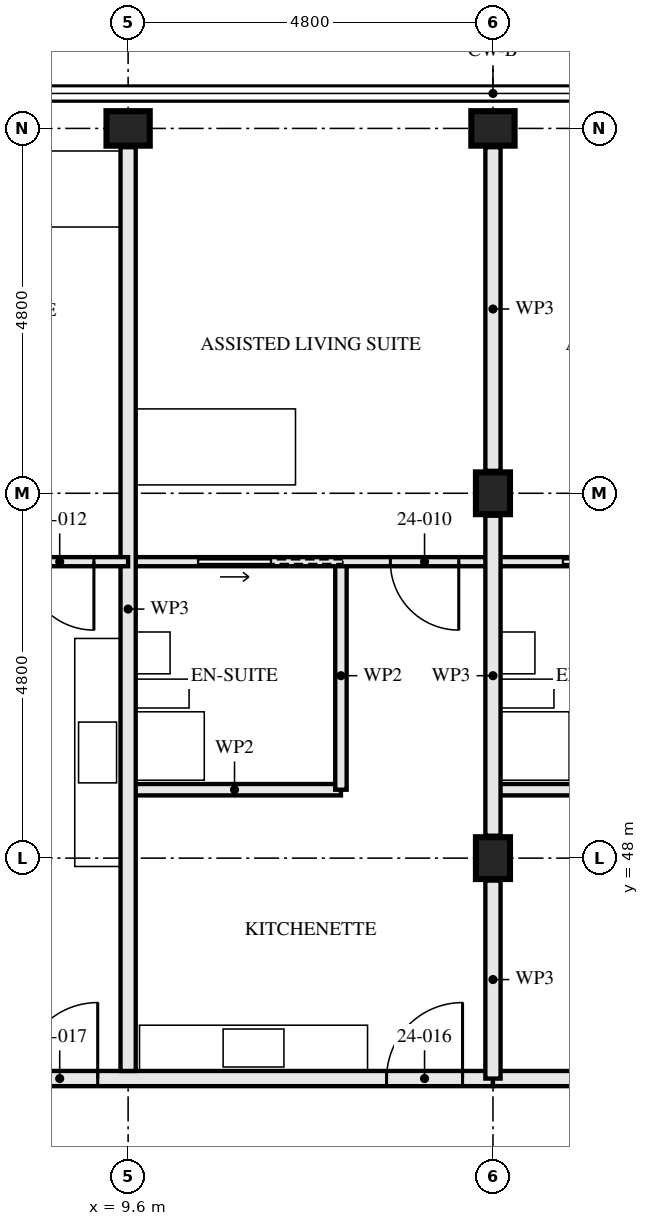
"""IFC4 building model, lengths in metres.
Left out: names, types, materials, properties, quantities, classifications, styles, units other than length and angle.
Written with IfcOpenShell. Run it as: python <this file> out.ifc"""

import sys

from ifc_helpers import new_model, si_unit, direction, frame, frame_2d, origin, origin_2d, place, context, subcontext, project, spatial, rectangle, i_section, extrude, element, fill, save


model = new_model("IFC4")
c1 = context("Model", 3, precision=1e-05, world=origin(), true_north=direction((0.0, 1.0)))
c2 = subcontext(c1, "Body", "Model", "MODEL_VIEW")
j1 = project(units=[si_unit("LENGTHUNIT", "METRE"), si_unit("PLANEANGLEUNIT", "RADIAN")], contexts=[c1])
p1 = place(None, origin())
s1 = spatial("IfcSite", under=j1, at=p1, CompositionType="ELEMENT")
p2 = place(p1, origin())
s2 = spatial("IfcBuilding", under=s1, at=p2, CompositionType="ELEMENT")
p3 = place(p2, frame((0.0, 0.0, 91.0)))
s3 = spatial("IfcBuildingStorey", under=s2, at=p3, CompositionType="ELEMENT", Elevation=91.0)
p4 = place(p3, frame((9.6, 57.6, 0.0), z_axis=(0.0, 0.0, 1.0), x_axis=(0.0, 1.0, 0.0)))
e1 = element("IfcColumn", 1, at=p4, inside=s3, PredefinedType="COLUMN", context=c2, shape_type="SweptSolid", body=[
    extrude(i_section(OverallWidth=0.454, OverallDepth=0.569, WebThickness=0.078, FlangeThickness=0.125, FilletRadius=0.015, at=origin_2d()), origin(), (0.0, 0.0, 1.0), 3.5),
])
for number, where, z_axis, x_axis in (
    (2, (14.4, 48.0, 0.0), (0.0, 0.0, 1.0), (1.0, 0.0, 0.0)),
    (3, (14.4, 52.8, 0.0), (0.0, 0.0, 1.0), (1.0, 0.0, 0.0)),
):
    element("IfcColumn", number, at=place(p3, frame(where, z_axis=z_axis, x_axis=x_axis)), inside=s3, PredefinedType="COLUMN", context=c2, shape_type="SweptSolid", body=[
        extrude(i_section(OverallWidth=0.448, OverallDepth=0.55, WebThickness=0.072, FlangeThickness=0.115, FilletRadius=0.015, at=origin_2d()), origin(), (0.0, 0.0, 1.0), 3.5),
    ])
p5 = place(p3, frame((14.4, 57.6, 0.0), z_axis=(0.0, 0.0, 1.0), x_axis=(0.0, 1.0, 0.0)))
e4 = element("IfcColumn", 4, at=p5, inside=s3, PredefinedType="COLUMN", context=c2, shape_type="SweptSolid", body=[
    extrude(i_section(OverallWidth=0.454, OverallDepth=0.569, WebThickness=0.078, FlangeThickness=0.125, FilletRadius=0.015, at=origin_2d()), origin(), (0.0, 0.0, 1.0), 3.5),
])
p6 = place(p3, frame((12.4, 51.9, 0.0), z_axis=(0.0, 0.0, 1.0), x_axis=(0.0, -1.0, 0.0)))
e5 = element("IfcWall", 5, at=p6, inside=s3, PredefinedType="PARTITIONING", context=c2, shape_type="SweptSolid", body=[
    extrude(rectangle(XDim=3.0, YDim=0.15, at=frame_2d((1.5, 0.0))), origin(), (0.0, 0.0, 1.0), 3.33),
])
p7 = place(p3, frame((12.4, 48.9, 0.0), z_axis=(0.0, 0.0, 1.0), x_axis=(-1.0, 0.0, 0.0)))
e6 = element("IfcWall", 6, at=p7, inside=s3, PredefinedType="PARTITIONING", context=c2, shape_type="SweptSolid", body=[
    extrude(rectangle(XDim=2.8, YDim=0.15, at=frame_2d((1.4, 0.0))), origin(), (0.0, 0.0, 1.0), 3.33),
])
p8 = place(p3, frame((14.4, 51.9, 0.0), z_axis=(0.0, 0.0, 1.0), x_axis=(-1.0, 0.0, 0.0)))
e7 = element("IfcWall", 7, at=p8, inside=s3, PredefinedType="PARTITIONING", context=c2, shape_type="SweptSolid", body=[
    extrude(rectangle(XDim=4.8, YDim=0.12, at=frame_2d((2.4, 0.0))), origin(), (0.0, 0.0, 1.0), 3.33),
])
p9 = place(p8, frame((0.45, 0.0, 0.0)))
e8 = element("IfcOpeningElement", 8, at=p9, cuts=e7, PredefinedType="OPENING", context=c2, shape_type="SweptSolid", body=[
    extrude(rectangle(XDim=0.9, YDim=2.1, at=frame_2d((0.45, 1.05))), frame((0.0, 0.071, 0.0), z_axis=(0.0, -1.0, 0.0), x_axis=(1.0, 0.0, 0.0)), (0.0, 0.0, 1.0), 0.141),
])
p10 = place(p8, frame((2.925, 0.0, 0.0)))
e9 = element("IfcOpeningElement", 9, at=p10, cuts=e7, PredefinedType="OPENING", context=c2, shape_type="SweptSolid", body=[
    extrude(rectangle(XDim=0.95, YDim=2.1, at=frame_2d((0.475, 1.05))), frame((0.0, 0.071, 0.0), z_axis=(0.0, -1.0, 0.0), x_axis=(1.0, 0.0, 0.0)), (0.0, 0.0, 1.0), 0.141),
])
p11 = place(p3, frame((9.6, 57.353, 0.0), z_axis=(0.0, 0.0, 1.0), x_axis=(0.0, -1.0, 0.0)))
e10 = element("IfcWall", 10, at=p11, inside=s3, PredefinedType="PARTITIONING", context=c2, shape_type="SweptSolid", body=[
    extrude(rectangle(XDim=12.153, YDim=0.2, at=frame_2d((6.077, 0.0))), origin(), (0.0, 0.0, 1.0), 2.55),
])
p12 = place(p3, frame((9.6, 51.9, 0.0), z_axis=(0.0, 0.0, 1.0), x_axis=(-1.0, 0.0, 0.0)))
e11 = element("IfcWall", 11, at=p12, inside=s3, PredefinedType="PARTITIONING", context=c2, shape_type="SweptSolid", body=[
    extrude(rectangle(XDim=4.8, YDim=0.12, at=frame_2d((2.4, 0.0))), origin(), (0.0, 0.0, 1.0), 3.33),
])
p13 = place(p12, frame((0.45, 0.0, 0.0)))
e12 = element("IfcOpeningElement", 12, at=p13, cuts=e11, PredefinedType="OPENING", context=c2, shape_type="SweptSolid", body=[
    extrude(rectangle(XDim=0.9, YDim=2.1, at=frame_2d((0.45, 1.05))), frame((0.0, 0.071, 0.0), z_axis=(0.0, -1.0, 0.0), x_axis=(1.0, 0.0, 0.0)), (0.0, 0.0, 1.0), 0.141),
])
p14 = place(p12, frame((2.925, 0.0, 0.0)))
e13 = element("IfcOpeningElement", 13, at=p14, cuts=e11, PredefinedType="OPENING", context=c2, shape_type="SweptSolid", body=[
    extrude(rectangle(XDim=0.95, YDim=2.1, at=frame_2d((0.475, 1.05))), frame((0.0, 0.071, 0.0), z_axis=(0.0, -1.0, 0.0), x_axis=(1.0, 0.0, 0.0)), (0.0, 0.0, 1.0), 0.141),
])
p15 = place(p3, frame((14.4, 45.1, 0.0), z_axis=(0.0, 0.0, 1.0), x_axis=(-1.0, 0.0, 0.0)))
e14 = element("IfcWall", 14, at=p15, inside=s3, PredefinedType="PARTITIONING", context=c2, shape_type="SweptSolid", body=[
    extrude(rectangle(XDim=9.6, YDim=0.2, at=frame_2d((4.8, 0.0))), origin(), (0.0, 0.0, 1.0), 3.33),
])
p16 = place(p15, frame((0.4, 0.0, 0.0)))
e15 = element("IfcOpeningElement", 15, at=p16, cuts=e14, PredefinedType="OPENING", context=c2, shape_type="SweptSolid", body=[
    extrude(rectangle(XDim=1.0, YDim=2.1, at=frame_2d((0.5, 1.05))), frame((0.0, 0.111, 0.0), z_axis=(0.0, -1.0, 0.0), x_axis=(1.0, 0.0, 0.0)), (0.0, 0.0, 1.0), 0.221),
])
p17 = place(p15, frame((5.2, 0.0, 0.0)))
e16 = element("IfcOpeningElement", 16, at=p17, cuts=e14, PredefinedType="OPENING", context=c2, shape_type="SweptSolid", body=[
    extrude(rectangle(XDim=1.0, YDim=2.1, at=frame_2d((0.5, 1.05))), frame((0.0, 0.111, 0.0), z_axis=(0.0, -1.0, 0.0), x_axis=(1.0, 0.0, 0.0)), (0.0, 0.0, 1.0), 0.221),
])
p18 = place(p3, frame((17.2, 48.9, 0.0), z_axis=(0.0, 0.0, 1.0), x_axis=(-1.0, 0.0, 0.0)))
e17 = element("IfcWall", 17, at=p18, inside=s3, PredefinedType="PARTITIONING", context=c2, shape_type="SweptSolid", body=[
    extrude(rectangle(XDim=2.8, YDim=0.15, at=frame_2d((1.4, 0.0))), origin(), (0.0, 0.0, 1.0), 3.33),
])
p19 = place(p3, frame((19.2, 51.9, 0.0), z_axis=(0.0, 0.0, 1.0), x_axis=(-1.0, 0.0, 0.0)))
e18 = element("IfcWall", 18, at=p19, inside=s3, PredefinedType="PARTITIONING", context=c2, shape_type="SweptSolid", body=[
    extrude(rectangle(XDim=4.8, YDim=0.12, at=frame_2d((2.4, 0.0))), origin(), (0.0, 0.0, 1.0), 3.33),
])
p20 = place(p19, frame((0.45, 0.0, 0.0)))
e19 = element("IfcOpeningElement", 19, at=p20, cuts=e18, PredefinedType="OPENING", context=c2, shape_type="SweptSolid", body=[
    extrude(rectangle(XDim=0.9, YDim=2.1, at=frame_2d((0.45, 1.05))), frame((0.0, 0.071, 0.0), z_axis=(0.0, -1.0, 0.0), x_axis=(1.0, 0.0, 0.0)), (0.0, 0.0, 1.0), 0.141),
])
p21 = place(p19, frame((2.925, 0.0, 0.0)))
e20 = element("IfcOpeningElement", 20, at=p21, cuts=e18, PredefinedType="OPENING", context=c2, shape_type="SweptSolid", body=[
    extrude(rectangle(XDim=0.95, YDim=2.1, at=frame_2d((0.475, 1.05))), frame((0.0, 0.071, 0.0), z_axis=(0.0, -1.0, 0.0), x_axis=(1.0, 0.0, 0.0)), (0.0, 0.0, 1.0), 0.141),
])
p22 = place(p3, frame((29.24, 45.1, 0.0), z_axis=(0.0, 0.0, 1.0), x_axis=(-1.0, 0.0, 0.0)))
e21 = element("IfcWall", 21, at=p22, inside=s3, PredefinedType="PARTITIONING", context=c2, shape_type="SweptSolid", body=[
    extrude(rectangle(XDim=14.84, YDim=0.2, at=frame_2d((7.42, 0.0))), origin(), (0.0, 0.0, 1.0), 2.32),
])
p23 = place(p22, frame((0.84, 0.0, 0.0)))
e22 = element("IfcOpeningElement", 22, at=p23, cuts=e21, PredefinedType="OPENING", context=c2, shape_type="SweptSolid", body=[
    extrude(rectangle(XDim=1.0, YDim=2.1, at=frame_2d((0.5, 1.05))), frame((0.0, 0.111, 0.0), z_axis=(0.0, -1.0, 0.0), x_axis=(1.0, 0.0, 0.0)), (0.0, 0.0, 1.0), 0.221),
])
p24 = place(p22, frame((5.64, 0.0, 0.0)))
e23 = element("IfcOpeningElement", 23, at=p24, cuts=e21, PredefinedType="OPENING", context=c2, shape_type="SweptSolid", body=[
    extrude(rectangle(XDim=1.0, YDim=2.1, at=frame_2d((0.5, 1.05))), frame((0.0, 0.111, 0.0), z_axis=(0.0, -1.0, 0.0), x_axis=(1.0, 0.0, 0.0)), (0.0, 0.0, 1.0), 0.221),
])
p25 = place(p22, frame((10.44, 0.0, 0.0)))
e24 = element("IfcOpeningElement", 24, at=p25, cuts=e21, PredefinedType="OPENING", context=c2, shape_type="SweptSolid", body=[
    extrude(rectangle(XDim=1.0, YDim=2.1, at=frame_2d((0.5, 1.05))), frame((0.0, 0.111, 0.0), z_axis=(0.0, -1.0, 0.0), x_axis=(1.0, 0.0, 0.0)), (0.0, 0.0, 1.0), 0.221),
])
p26 = place(p3, frame((14.4, 45.1, 0.0), z_axis=(0.0, 0.0, 1.0), x_axis=(0.0, 1.0, 0.0)))
e25 = element("IfcWall", 25, at=p26, inside=s3, PredefinedType="PARTITIONING", context=c2, shape_type="SweptSolid", body=[
    extrude(rectangle(XDim=2.605, YDim=0.2, at=frame_2d((1.302, 0.0))), origin(), (0.0, 0.0, 1.0), 2.32),
])
p27 = place(p3, frame((14.4, 48.295, 0.0), z_axis=(0.0, 0.0, 1.0), x_axis=(0.0, 1.0, 0.0)))
e26 = element("IfcWall", 26, at=p27, inside=s3, PredefinedType="PARTITIONING", context=c2, shape_type="SweptSolid", body=[
    extrude(rectangle(XDim=4.21, YDim=0.2, at=frame_2d((2.105, 0.0))), origin(), (0.0, 0.0, 1.0), 2.32),
])
p28 = place(p3, frame((14.4, 53.095, 0.0), z_axis=(0.0, 0.0, 1.0), x_axis=(0.0, 1.0, 0.0)))
e27 = element("IfcWall", 27, at=p28, inside=s3, PredefinedType="PARTITIONING", context=c2, shape_type="SweptSolid", body=[
    extrude(rectangle(XDim=4.258, YDim=0.2, at=frame_2d((2.129, 0.0))), origin(), (0.0, 0.0, 1.0), 2.32),
])
p29 = place(p9, origin())
e28 = element("IfcDoor", 28, at=p29, inside=s3, OperationType="SINGLE_SWING_RIGHT", PredefinedType="DOOR", context=c2, shape_type="SweptSolid", body=[
    extrude(rectangle(XDim=0.9, YDim=2.1, at=frame_2d((0.45, 1.05))), frame((0.0, 0.022, 0.0), z_axis=(0.0, -1.0, 0.0), x_axis=(1.0, 0.0, 0.0)), (0.0, 0.0, 1.0), 0.044),
])
fill(e8, e28)
p30 = place(p10, origin())
e29 = element("IfcDoor", 29, at=p30, inside=s3, OperationType="SLIDING_TO_RIGHT", PredefinedType="DOOR", context=c2, shape_type="SweptSolid", body=[
    extrude(rectangle(XDim=0.95, YDim=2.1, at=frame_2d((0.475, 1.05))), frame((0.0, 0.022, 0.0), z_axis=(0.0, -1.0, 0.0), x_axis=(1.0, 0.0, 0.0)), (0.0, 0.0, 1.0), 0.044),
])
fill(e9, e29)
p31 = place(p13, origin())
e30 = element("IfcDoor", 30, at=p31, inside=s3, OperationType="SINGLE_SWING_RIGHT", PredefinedType="DOOR", context=c2, shape_type="SweptSolid", body=[
    extrude(rectangle(XDim=0.9, YDim=2.1, at=frame_2d((0.45, 1.05))), frame((0.0, 0.022, 0.0), z_axis=(0.0, -1.0, 0.0), x_axis=(1.0, 0.0, 0.0)), (0.0, 0.0, 1.0), 0.044),
])
fill(e12, e30)
p32 = place(p16, frame((1.0, 0.0, 0.0), z_axis=(0.0, 0.0, 1.0), x_axis=(-1.0, 0.0, 0.0)))
e31 = element("IfcDoor", 31, at=p32, inside=s3, OperationType="SINGLE_SWING_LEFT", PredefinedType="DOOR", context=c2, shape_type="SweptSolid", body=[
    extrude(rectangle(XDim=1.0, YDim=2.1, at=frame_2d((0.5, 1.05))), frame((0.0, 0.027, 0.0), z_axis=(0.0, -1.0, 0.0), x_axis=(1.0, 0.0, 0.0)), (0.0, 0.0, 1.0), 0.054),
])
fill(e15, e31)
p33 = place(p17, frame((1.0, 0.0, 0.0), z_axis=(0.0, 0.0, 1.0), x_axis=(-1.0, 0.0, 0.0)))
e32 = element("IfcDoor", 32, at=p33, inside=s3, OperationType="SINGLE_SWING_LEFT", PredefinedType="DOOR", context=c2, shape_type="SweptSolid", body=[
    extrude(rectangle(XDim=1.0, YDim=2.1, at=frame_2d((0.5, 1.05))), frame((0.0, 0.027, 0.0), z_axis=(0.0, -1.0, 0.0), x_axis=(1.0, 0.0, 0.0)), (0.0, 0.0, 1.0), 0.054),
])
fill(e16, e32)
p34 = place(p21, origin())
e33 = element("IfcDoor", 33, at=p34, inside=s3, OperationType="SLIDING_TO_RIGHT", PredefinedType="DOOR", context=c2, shape_type="SweptSolid", body=[
    extrude(rectangle(XDim=0.95, YDim=2.1, at=frame_2d((0.475, 1.05))), frame((0.0, 0.022, 0.0), z_axis=(0.0, -1.0, 0.0), x_axis=(1.0, 0.0, 0.0)), (0.0, 0.0, 1.0), 0.044),
])
fill(e20, e33)
save(model, sys.argv[1])
